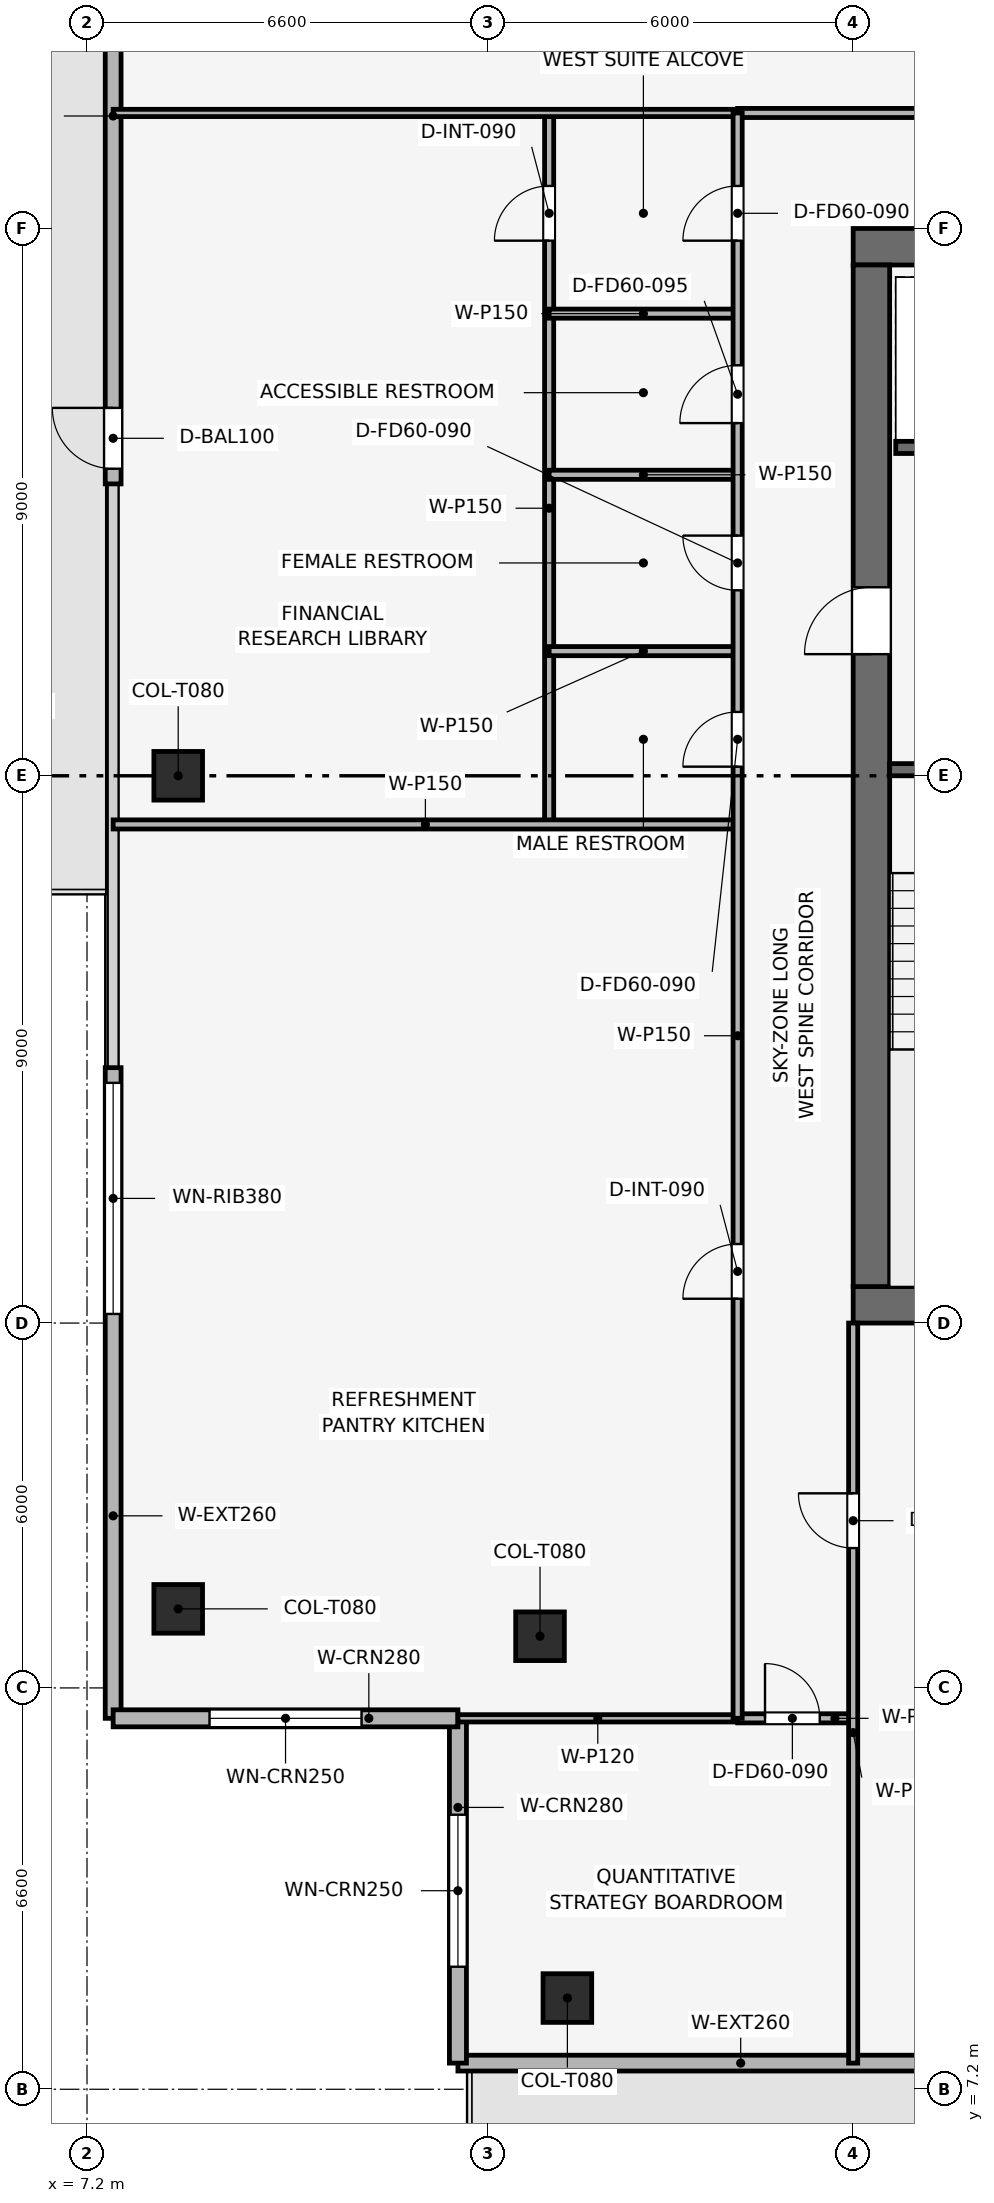
"""IFC4 building model, lengths in metres.
Left out: names, types, materials, properties, quantities, classifications, styles, units other than length and angle.
Written with IfcOpenShell. Run it as: python <this file> out.ifc"""

import sys

from ifc_helpers import new_model, si_unit, direction, frame, frame_2d, origin, origin_2d, place, context, subcontext, project, spatial, rectangle, extrude, element, fill, save


model = new_model("IFC4")
c1 = context("Model", 3, precision=1e-05, world=origin(), true_north=direction((0.0, 1.0)))
c2 = subcontext(c1, "Body", "Model", "MODEL_VIEW")
j1 = project(units=[si_unit("LENGTHUNIT", "METRE"), si_unit("PLANEANGLEUNIT", "RADIAN")], contexts=[c1])
p1 = place(None, origin())
s1 = spatial("IfcSite", under=j1, at=p1, CompositionType="ELEMENT")
p2 = place(p1, origin())
s2 = spatial("IfcBuilding", under=s1, at=p2, CompositionType="ELEMENT")
p3 = place(p2, frame((0.0, 0.0, 348.0)))
s3 = spatial("IfcBuildingStorey", under=s2, at=p3, CompositionType="ELEMENT", Elevation=348.0)
p4 = place(p3, frame((19.8, 20.1, 0.0), z_axis=(0.0, 0.0, 1.0), x_axis=(1.0, 0.0, 0.0)))
e1 = element("IfcWall", 1, at=p4, inside=s3, PredefinedType="SHEAR", context=c2, shape_type="SweptSolid", body=[
    extrude(rectangle(XDim=18.0, YDim=0.6, at=frame_2d((9.0, 0.0))), origin(), (0.0, 0.0, 1.0), 3.75),
])
p5 = place(p3, frame((19.8, 37.5, 0.0), z_axis=(0.0, 0.0, 1.0), x_axis=(1.0, 0.0, 0.0)))
e2 = element("IfcWall", 2, at=p5, inside=s3, PredefinedType="SHEAR", context=c2, shape_type="SweptSolid", body=[
    extrude(rectangle(XDim=18.0, YDim=0.6, at=frame_2d((9.0, 0.0))), origin(), (0.0, 0.0, 1.0), 3.75),
])
p6 = place(p5, frame((7.05, 0.0, 0.0)))
e3 = element("IfcOpeningElement", 3, at=p6, cuts=e2, PredefinedType="OPENING", context=c2, shape_type="SweptSolid", body=[
    extrude(rectangle(XDim=1.1, YDim=2.15, at=frame_2d((0.55, 1.075))), frame((0.0, 0.31, 0.0), z_axis=(0.0, -1.0, 0.0), x_axis=(1.0, 0.0, 0.0)), (0.0, 0.0, 1.0), 0.62),
])
p7 = place(p3, frame((20.1, 20.4, 0.0), z_axis=(0.0, 0.0, 1.0), x_axis=(0.0, 1.0, 0.0)))
e4 = element("IfcWall", 4, at=p7, inside=s3, PredefinedType="SHEAR", context=c2, shape_type="SweptSolid", body=[
    extrude(rectangle(XDim=16.8, YDim=0.6, at=frame_2d((8.4, 0.0))), origin(), (0.0, 0.0, 1.0), 3.75),
])
p8 = place(p7, frame((10.4, 0.0, 0.0)))
e5 = element("IfcOpeningElement", 5, at=p8, cuts=e4, PredefinedType="OPENING", context=c2, shape_type="SweptSolid", body=[
    extrude(rectangle(XDim=1.1, YDim=2.15, at=frame_2d((0.55, 1.075))), frame((0.0, 0.31, 0.0), z_axis=(0.0, -1.0, 0.0), x_axis=(1.0, 0.0, 0.0)), (0.0, 0.0, 1.0), 0.62),
])
for number, where, z_axis, x_axis in (
    (6, (15.1, 8.7, 0.003), (0.0, 0.0, 1.0), (1.0, 0.0, 0.0)),
    (7, (8.7, 28.8, 0.003), (0.0, 0.0, 1.0), (1.0, 0.0, 0.0)),
    (8, (8.7, 15.1, 0.003), (0.0, 0.0, 1.0), (1.0, 0.0, 0.0)),
    (9, (14.65, 14.65, 0.003), (0.0, 0.0, 1.0), (1.0, 0.0, 0.0)),
):
    element("IfcColumn", number, at=place(p3, frame(where, z_axis=z_axis, x_axis=x_axis)), inside=s3, PredefinedType="COLUMN", context=c2, shape_type="SweptSolid", body=[
        extrude(rectangle(XDim=0.8, YDim=0.8, at=origin_2d()), origin(), (0.0, 0.0, 1.0), 3.504),
    ])
p9 = place(p3, frame((24.0, 7.63, 0.0), z_axis=(0.0, 0.0, 1.0), x_axis=(-1.0, 0.0, 0.0)))
e10 = element("IfcWall", 10, at=p9, inside=s3, PredefinedType="SOLIDWALL", context=c2, shape_type="SweptSolid", body=[
    extrude(rectangle(XDim=10.7, YDim=0.26, at=frame_2d((5.35, 0.0))), origin(), (0.0, 0.0, 1.0), 3.51),
])
p10 = place(p9, frame((0.25, 0.0, 0.0)))
e11 = element("IfcOpeningElement", 11, at=p10, cuts=e10, PredefinedType="OPENING", context=c2, shape_type="SweptSolid", body=[
    extrude(rectangle(XDim=1.0, YDim=2.2, at=frame_2d((0.5, 1.1))), frame((0.0, 0.14, 0.0), z_axis=(0.0, -1.0, 0.0), x_axis=(1.0, 0.0, 0.0)), (0.0, 0.0, 1.0), 0.28),
])
p11 = place(p3, frame((7.63, 13.3, 0.0), z_axis=(0.0, 0.0, 1.0), x_axis=(0.0, 1.0, 0.0)))
e12 = element("IfcWall", 12, at=p11, inside=s3, PredefinedType="SOLIDWALL", context=c2, shape_type="SweptSolid", body=[
    extrude(rectangle(XDim=10.7, YDim=0.26, at=frame_2d((5.35, 0.0))), origin(), (0.0, 0.0, 1.0), 3.51),
])
p12 = place(p11, frame((6.65, 0.0, 0.9)))
e13 = element("IfcOpeningElement", 13, at=p12, cuts=e12, PredefinedType="OPENING", context=c2, shape_type="SweptSolid", body=[
    extrude(rectangle(XDim=3.8, YDim=1.9, at=frame_2d((1.9, 0.95))), frame((0.0, 0.14, 0.0), z_axis=(0.0, -1.0, 0.0), x_axis=(1.0, 0.0, 0.0)), (0.0, 0.0, 1.0), 0.28),
])
p13 = place(p3, frame((7.63, 33.6, 0.0), z_axis=(0.0, 0.0, 1.0), x_axis=(0.0, 1.0, 0.0)))
e14 = element("IfcWall", 14, at=p13, inside=s3, PredefinedType="SOLIDWALL", context=c2, shape_type="SweptSolid", body=[
    extrude(rectangle(XDim=10.7, YDim=0.26, at=frame_2d((5.35, 0.0))), origin(), (0.0, 0.0, 1.0), 3.51),
])
p14 = place(p13, frame((0.25, 0.0, 0.0)))
e15 = element("IfcOpeningElement", 15, at=p14, cuts=e14, PredefinedType="OPENING", context=c2, shape_type="SweptSolid", body=[
    extrude(rectangle(XDim=1.0, YDim=2.2, at=frame_2d((0.5, 1.1))), frame((0.0, 0.14, 0.0), z_axis=(0.0, -1.0, 0.0), x_axis=(1.0, 0.0, 0.0)), (0.0, 0.0, 1.0), 0.28),
])
p15 = place(p3, frame((13.3, 7.63, 0.0), z_axis=(0.0, 0.0, 1.0), x_axis=(0.0, 1.0, 0.0)))
e16 = element("IfcWall", 16, at=p15, inside=s3, PredefinedType="SOLIDWALL", context=c2, shape_type="SweptSolid", body=[
    extrude(rectangle(XDim=5.67, YDim=0.28, at=frame_2d((2.835, 0.0))), origin(), (0.0, 0.0, 1.0), 3.51),
])
p16 = place(p15, frame((1.585, 0.0, 0.9)))
e17 = element("IfcOpeningElement", 17, at=p16, cuts=e16, PredefinedType="OPENING", context=c2, shape_type="SweptSolid", body=[
    extrude(rectangle(XDim=2.5, YDim=1.9, at=frame_2d((1.25, 0.95))), frame((0.0, 0.15, 0.0), z_axis=(0.0, -1.0, 0.0), x_axis=(1.0, 0.0, 0.0)), (0.0, 0.0, 1.0), 0.3),
])
p17 = place(p3, frame((13.3, 13.3, 0.0), z_axis=(0.0, 0.0, 1.0), x_axis=(-1.0, 0.0, 0.0)))
e18 = element("IfcWall", 18, at=p17, inside=s3, PredefinedType="SOLIDWALL", context=c2, shape_type="SweptSolid", body=[
    extrude(rectangle(XDim=5.67, YDim=0.28, at=frame_2d((2.835, 0.0))), origin(), (0.0, 0.0, 1.0), 3.51),
])
p18 = place(p17, frame((1.585, 0.0, 0.9)))
e19 = element("IfcOpeningElement", 19, at=p18, cuts=e18, PredefinedType="OPENING", context=c2, shape_type="SweptSolid", body=[
    extrude(rectangle(XDim=2.5, YDim=1.9, at=frame_2d((1.25, 0.95))), frame((0.0, 0.15, 0.0), z_axis=(0.0, -1.0, 0.0), x_axis=(1.0, 0.0, 0.0)), (0.0, 0.0, 1.0), 0.3),
])
p19 = place(p3, frame((20.4, 28.9, 0.0), z_axis=(0.0, 0.0, 1.0), x_axis=(1.0, 0.0, 0.0)))
e20 = element("IfcWall", 20, at=p19, inside=s3, PredefinedType="SHEAR", context=c2, shape_type="SweptSolid", body=[
    extrude(rectangle(XDim=3.15, YDim=0.2, at=frame_2d((1.575, 0.0))), origin(), (0.0, 0.0, 1.0), 3.51),
])
p20 = place(p19, frame((0.8, 0.0, 0.0)))
e21 = element("IfcOpeningElement", 21, at=p20, cuts=e20, PredefinedType="OPENING", context=c2, shape_type="SweptSolid", body=[
    extrude(rectangle(XDim=1.0, YDim=2.1, at=frame_2d((0.5, 1.05))), frame((0.0, 0.11, 0.0), z_axis=(0.0, -1.0, 0.0), x_axis=(1.0, 0.0, 0.0)), (0.0, 0.0, 1.0), 0.22),
])
p21 = place(p3, frame((20.5, 34.2, 0.0), z_axis=(0.0, 0.0, 1.0), x_axis=(1.0, 0.0, 0.0)))
e22 = element("IfcWall", 22, at=p21, inside=s3, PredefinedType="SHEAR", context=c2, shape_type="SweptSolid", body=[
    extrude(rectangle(XDim=3.05, YDim=0.2, at=frame_2d((1.525, 0.0))), origin(), (0.0, 0.0, 1.0), 3.51),
])
p22 = place(p21, frame((0.75, 0.0, 0.0)))
e23 = element("IfcOpeningElement", 23, at=p22, cuts=e22, PredefinedType="OPENING", context=c2, shape_type="SweptSolid", body=[
    extrude(rectangle(XDim=1.1, YDim=2.15, at=frame_2d((0.55, 1.075))), frame((0.0, 0.11, 0.0), z_axis=(0.0, -1.0, 0.0), x_axis=(1.0, 0.0, 0.0)), (0.0, 0.0, 1.0), 0.22),
])
p23 = place(p3, frame((14.8, 28.0, 0.0), z_axis=(0.0, 0.0, 1.0), x_axis=(0.0, 1.0, 0.0)))
e24 = element("IfcWall", 24, at=p23, inside=s3, PredefinedType="PARTITIONING", context=c2, shape_type="SweptSolid", body=[
    extrude(rectangle(XDim=11.7, YDim=0.15, at=frame_2d((5.85, 0.0))), origin(), (0.0, 0.0, 1.0), 3.095),
])
p24 = place(p23, frame((9.6, 0.0, 0.0)))
e25 = element("IfcOpeningElement", 25, at=p24, cuts=e24, PredefinedType="OPENING", context=c2, shape_type="SweptSolid", body=[
    extrude(rectangle(XDim=0.9, YDim=2.1, at=frame_2d((0.45, 1.05))), frame((0.0, 0.085, 0.0), z_axis=(0.0, -1.0, 0.0), x_axis=(1.0, 0.0, 0.0)), (0.0, 0.0, 1.0), 0.17),
])
p25 = place(p3, frame((7.63, 28.0, 0.0), z_axis=(0.0, 0.0, 1.0), x_axis=(1.0, 0.0, 0.0)))
e26 = element("IfcWall", 26, at=p25, inside=s3, PredefinedType="PARTITIONING", context=c2, shape_type="SweptSolid", body=[
    extrude(rectangle(XDim=10.27, YDim=0.15, at=frame_2d((5.135, 0.0))), origin(), (0.0, 0.0, 1.0), 3.135),
])
for number, where, z_axis, x_axis in (
    (27, (14.8, 36.4, 0.0), (0.0, 0.0, 1.0), (1.0, 0.0, 0.0)),
    (28, (14.8, 30.85, 0.0), (0.0, 0.0, 1.0), (1.0, 0.0, 0.0)),
    (29, (14.8, 33.75, 0.0), (0.0, 0.0, 1.0), (1.0, 0.0, 0.0)),
):
    element("IfcWall", number, at=place(p3, frame(where, z_axis=z_axis, x_axis=x_axis)), inside=s3, PredefinedType="PARTITIONING", context=c2, shape_type="SweptSolid", body=[
        extrude(rectangle(XDim=3.1, YDim=0.15, at=frame_2d((1.55, 0.0))), origin(), (0.0, 0.0, 1.0), 3.135),
    ])
p26 = place(p3, frame((13.3, 13.3, 0.0), z_axis=(0.0, 0.0, 1.0), x_axis=(1.0, 0.0, 0.0)))
e30 = element("IfcWall", 30, at=p26, inside=s3, PredefinedType="PARTITIONING", context=c2, shape_type="SweptSolid", body=[
    extrude(rectangle(XDim=4.6, YDim=0.12, at=frame_2d((2.3, 0.0))), origin(), (0.0, 0.0, 1.0), 3.195),
])
p27 = place(p3, frame((17.9, 13.3, 0.0), z_axis=(0.0, 0.0, 1.0), x_axis=(1.0, 0.0, 0.0)))
e31 = element("IfcWall", 31, at=p27, inside=s3, PredefinedType="PARTITIONING", context=c2, shape_type="SweptSolid", body=[
    extrude(rectangle(XDim=1.9, YDim=0.15, at=frame_2d((0.95, 0.0))), origin(), (0.0, 0.0, 1.0), 3.51),
])
p28 = place(p27, frame((0.45, 0.0, 0.0)))
e32 = element("IfcOpeningElement", 32, at=p28, cuts=e31, PredefinedType="OPENING", context=c2, shape_type="SweptSolid", body=[
    extrude(rectangle(XDim=0.9, YDim=2.1, at=frame_2d((0.45, 1.05))), frame((0.0, 0.085, 0.0), z_axis=(0.0, -1.0, 0.0), x_axis=(1.0, 0.0, 0.0)), (0.0, 0.0, 1.0), 0.17),
])
p29 = place(p3, frame((19.8, 7.63, 0.0), z_axis=(0.0, 0.0, 1.0), x_axis=(0.0, 1.0, 0.0)))
e33 = element("IfcWall", 33, at=p29, inside=s3, PredefinedType="PARTITIONING", context=c2, shape_type="SweptSolid", body=[
    extrude(rectangle(XDim=12.17, YDim=0.15, at=frame_2d((6.085, 0.0))), origin(), (0.0, 0.0, 1.0), 3.095),
])
p30 = place(p29, frame((8.47, 0.0, 0.0)))
e34 = element("IfcOpeningElement", 34, at=p30, cuts=e33, PredefinedType="OPENING", context=c2, shape_type="SweptSolid", body=[
    extrude(rectangle(XDim=0.9, YDim=2.1, at=frame_2d((0.45, 1.05))), frame((0.0, 0.085, 0.0), z_axis=(0.0, -1.0, 0.0), x_axis=(1.0, 0.0, 0.0)), (0.0, 0.0, 1.0), 0.17),
])
p31 = place(p3, frame((7.63, 39.7, 0.0), z_axis=(0.0, 0.0, 1.0), x_axis=(1.0, 0.0, 0.0)))
e35 = element("IfcWall", 35, at=p31, inside=s3, PredefinedType="PARTITIONING", context=c2, shape_type="SweptSolid", body=[
    extrude(rectangle(XDim=10.27, YDim=0.12, at=frame_2d((5.135, 0.0))), origin(), (0.0, 0.0, 1.0), 3.095),
])
p32 = place(p3, frame((17.9, 39.7, 0.0), z_axis=(0.0, 0.0, 1.0), x_axis=(1.0, 0.0, 0.0)))
e36 = element("IfcWall", 36, at=p32, inside=s3, PredefinedType="PARTITIONING", context=c2, shape_type="SweptSolid", body=[
    extrude(rectangle(XDim=21.8, YDim=0.15, at=frame_2d((10.9, 0.0))), origin(), (0.0, 0.0, 1.0), 3.095),
])
p33 = place(p32, frame((5.516, 0.0, 0.0)))
e37 = element("IfcOpeningElement", 37, at=p33, cuts=e36, PredefinedType="OPENING", context=c2, shape_type="SweptSolid", body=[
    extrude(rectangle(XDim=0.9, YDim=2.1, at=frame_2d((0.45, 1.05))), frame((0.0, 0.085, 0.0), z_axis=(0.0, -1.0, 0.0), x_axis=(1.0, 0.0, 0.0)), (0.0, 0.0, 1.0), 0.17),
])
p34 = place(p32, frame((16.416, 0.0, 0.0)))
e38 = element("IfcOpeningElement", 38, at=p34, cuts=e36, PredefinedType="OPENING", context=c2, shape_type="SweptSolid", body=[
    extrude(rectangle(XDim=0.9, YDim=2.1, at=frame_2d((0.45, 1.05))), frame((0.0, 0.085, 0.0), z_axis=(0.0, -1.0, 0.0), x_axis=(1.0, 0.0, 0.0)), (0.0, 0.0, 1.0), 0.17),
])
p35 = place(p3, frame((17.9, 13.3, 0.0), z_axis=(0.0, 0.0, 1.0), x_axis=(0.0, 1.0, 0.0)))
e39 = element("IfcWall", 39, at=p35, inside=s3, PredefinedType="PARTITIONING", context=c2, shape_type="SweptSolid", body=[
    extrude(rectangle(XDim=26.4, YDim=0.15, at=frame_2d((13.2, 0.0))), origin(), (0.0, 0.0, 1.0), 3.095),
])
p36 = place(p35, frame((6.9, 0.0, 0.0)))
e40 = element("IfcOpeningElement", 40, at=p36, cuts=e39, PredefinedType="OPENING", context=c2, shape_type="SweptSolid", body=[
    extrude(rectangle(XDim=0.9, YDim=2.1, at=frame_2d((0.45, 1.05))), frame((0.0, 0.085, 0.0), z_axis=(0.0, -1.0, 0.0), x_axis=(1.0, 0.0, 0.0)), (0.0, 0.0, 1.0), 0.17),
])
p37 = place(p35, frame((15.65, 0.0, 0.0)))
e41 = element("IfcOpeningElement", 41, at=p37, cuts=e39, PredefinedType="OPENING", context=c2, shape_type="SweptSolid", body=[
    extrude(rectangle(XDim=0.9, YDim=2.1, at=frame_2d((0.45, 1.05))), frame((0.0, 0.085, 0.0), z_axis=(0.0, -1.0, 0.0), x_axis=(1.0, 0.0, 0.0)), (0.0, 0.0, 1.0), 0.17),
])
p38 = place(p35, frame((18.55, 0.0, 0.0)))
e42 = element("IfcOpeningElement", 42, at=p38, cuts=e39, PredefinedType="OPENING", context=c2, shape_type="SweptSolid", body=[
    extrude(rectangle(XDim=0.9, YDim=2.1, at=frame_2d((0.45, 1.05))), frame((0.0, 0.085, 0.0), z_axis=(0.0, -1.0, 0.0), x_axis=(1.0, 0.0, 0.0)), (0.0, 0.0, 1.0), 0.17),
])
p39 = place(p35, frame((21.3, 0.0, 0.0)))
e43 = element("IfcOpeningElement", 43, at=p39, cuts=e39, PredefinedType="OPENING", context=c2, shape_type="SweptSolid", body=[
    extrude(rectangle(XDim=0.95, YDim=2.1, at=frame_2d((0.475, 1.05))), frame((0.0, 0.085, 0.0), z_axis=(0.0, -1.0, 0.0), x_axis=(1.0, 0.0, 0.0)), (0.0, 0.0, 1.0), 0.17),
])
p40 = place(p35, frame((24.3, 0.0, 0.0)))
e44 = element("IfcOpeningElement", 44, at=p40, cuts=e39, PredefinedType="OPENING", context=c2, shape_type="SweptSolid", body=[
    extrude(rectangle(XDim=0.9, YDim=2.1, at=frame_2d((0.45, 1.05))), frame((0.0, 0.085, 0.0), z_axis=(0.0, -1.0, 0.0), x_axis=(1.0, 0.0, 0.0)), (0.0, 0.0, 1.0), 0.17),
])
p41 = place(p14, origin())
e45 = element("IfcDoor", 45, at=p41, inside=s3, OperationType="SINGLE_SWING_RIGHT", PredefinedType="DOOR", context=c2, shape_type="SweptSolid", body=[
    extrude(rectangle(XDim=1.0, YDim=2.2, at=frame_2d((0.5, 1.1))), frame((0.0, 0.025, 0.0), z_axis=(0.0, -1.0, 0.0), x_axis=(1.0, 0.0, 0.0)), (0.0, 0.0, 1.0), 0.05),
])
fill(e15, e45)
p42 = place(p12, origin())
e46 = element("IfcWindow", 46, at=p42, inside=s3, PartitioningType="SINGLE_PANEL", PredefinedType="WINDOW", context=c2, shape_type="SweptSolid", body=[
    extrude(rectangle(XDim=3.8, YDim=1.9, at=frame_2d((1.9, 0.95))), frame((0.0, 0.03, 0.0), z_axis=(0.0, -1.0, 0.0), x_axis=(1.0, 0.0, 0.0)), (0.0, 0.0, 1.0), 0.06),
])
fill(e13, e46)
p43 = place(p16, origin())
e47 = element("IfcWindow", 47, at=p43, inside=s3, PartitioningType="SINGLE_PANEL", PredefinedType="WINDOW", context=c2, shape_type="SweptSolid", body=[
    extrude(rectangle(XDim=2.5, YDim=1.9, at=frame_2d((1.25, 0.95))), frame((0.0, 0.03, 0.0), z_axis=(0.0, -1.0, 0.0), x_axis=(1.0, 0.0, 0.0)), (0.0, 0.0, 1.0), 0.06),
])
fill(e17, e47)
p44 = place(p18, origin())
e48 = element("IfcWindow", 48, at=p44, inside=s3, PartitioningType="SINGLE_PANEL", PredefinedType="WINDOW", context=c2, shape_type="SweptSolid", body=[
    extrude(rectangle(XDim=2.5, YDim=1.9, at=frame_2d((1.25, 0.95))), frame((0.0, 0.03, 0.0), z_axis=(0.0, -1.0, 0.0), x_axis=(1.0, 0.0, 0.0)), (0.0, 0.0, 1.0), 0.06),
])
fill(e19, e48)
p45 = place(p24, origin())
e49 = element("IfcDoor", 49, at=p45, inside=s3, OperationType="SINGLE_SWING_LEFT", PredefinedType="DOOR", context=c2, shape_type="SweptSolid", body=[
    extrude(rectangle(XDim=0.9, YDim=2.1, at=frame_2d((0.45, 1.05))), frame((0.0, 0.025, 0.0), z_axis=(0.0, -1.0, 0.0), x_axis=(1.0, 0.0, 0.0)), (0.0, 0.0, 1.0), 0.05),
])
fill(e25, e49)
p46 = place(p28, origin())
e50 = element("IfcDoor", 50, at=p46, inside=s3, OperationType="SINGLE_SWING_LEFT", PredefinedType="DOOR", context=c2, shape_type="SweptSolid", body=[
    extrude(rectangle(XDim=0.9, YDim=2.1, at=frame_2d((0.45, 1.05))), frame((0.0, 0.025, 0.0), z_axis=(0.0, -1.0, 0.0), x_axis=(1.0, 0.0, 0.0)), (0.0, 0.0, 1.0), 0.05),
])
fill(e32, e50)
p47 = place(p30, origin())
e51 = element("IfcDoor", 51, at=p47, inside=s3, OperationType="SINGLE_SWING_RIGHT", PredefinedType="DOOR", context=c2, shape_type="SweptSolid", body=[
    extrude(rectangle(XDim=0.9, YDim=2.1, at=frame_2d((0.45, 1.05))), frame((0.0, 0.025, 0.0), z_axis=(0.0, -1.0, 0.0), x_axis=(1.0, 0.0, 0.0)), (0.0, 0.0, 1.0), 0.05),
])
fill(e34, e51)
p48 = place(p36, origin())
e52 = element("IfcDoor", 52, at=p48, inside=s3, OperationType="SINGLE_SWING_LEFT", PredefinedType="DOOR", context=c2, shape_type="SweptSolid", body=[
    extrude(rectangle(XDim=0.9, YDim=2.1, at=frame_2d((0.45, 1.05))), frame((0.0, 0.025, 0.0), z_axis=(0.0, -1.0, 0.0), x_axis=(1.0, 0.0, 0.0)), (0.0, 0.0, 1.0), 0.05),
])
fill(e40, e52)
p49 = place(p37, origin())
e53 = element("IfcDoor", 53, at=p49, inside=s3, OperationType="SINGLE_SWING_LEFT", PredefinedType="DOOR", context=c2, shape_type="SweptSolid", body=[
    extrude(rectangle(XDim=0.9, YDim=2.1, at=frame_2d((0.45, 1.05))), frame((0.0, 0.025, 0.0), z_axis=(0.0, -1.0, 0.0), x_axis=(1.0, 0.0, 0.0)), (0.0, 0.0, 1.0), 0.05),
])
fill(e41, e53)
p50 = place(p38, origin())
e54 = element("IfcDoor", 54, at=p50, inside=s3, OperationType="SINGLE_SWING_RIGHT", PredefinedType="DOOR", context=c2, shape_type="SweptSolid", body=[
    extrude(rectangle(XDim=0.9, YDim=2.1, at=frame_2d((0.45, 1.05))), frame((0.0, 0.025, 0.0), z_axis=(0.0, -1.0, 0.0), x_axis=(1.0, 0.0, 0.0)), (0.0, 0.0, 1.0), 0.05),
])
fill(e42, e54)
p51 = place(p39, origin())
e55 = element("IfcDoor", 55, at=p51, inside=s3, OperationType="SINGLE_SWING_LEFT", PredefinedType="DOOR", context=c2, shape_type="SweptSolid", body=[
    extrude(rectangle(XDim=0.95, YDim=2.1, at=frame_2d((0.475, 1.05))), frame((0.0, 0.025, 0.0), z_axis=(0.0, -1.0, 0.0), x_axis=(1.0, 0.0, 0.0)), (0.0, 0.0, 1.0), 0.05),
])
fill(e43, e55)
p52 = place(p40, origin())
e56 = element("IfcDoor", 56, at=p52, inside=s3, OperationType="SINGLE_SWING_LEFT", PredefinedType="DOOR", context=c2, shape_type="SweptSolid", body=[
    extrude(rectangle(XDim=0.9, YDim=2.1, at=frame_2d((0.45, 1.05))), frame((0.0, 0.025, 0.0), z_axis=(0.0, -1.0, 0.0), x_axis=(1.0, 0.0, 0.0)), (0.0, 0.0, 1.0), 0.05),
])
fill(e44, e56)
p53 = place(p8, origin())
e57 = element("IfcDoor", 57, at=p53, inside=s3, OperationType="SINGLE_SWING_LEFT", PredefinedType="DOOR", context=c2, shape_type="SweptSolid", body=[
    extrude(rectangle(XDim=1.1, YDim=2.15, at=frame_2d((0.55, 1.075))), frame((0.0, 0.025, 0.0), z_axis=(0.0, -1.0, 0.0), x_axis=(1.0, 0.0, 0.0)), (0.0, 0.0, 1.0), 0.05),
])
fill(e5, e57)
save(model, sys.argv[1])
